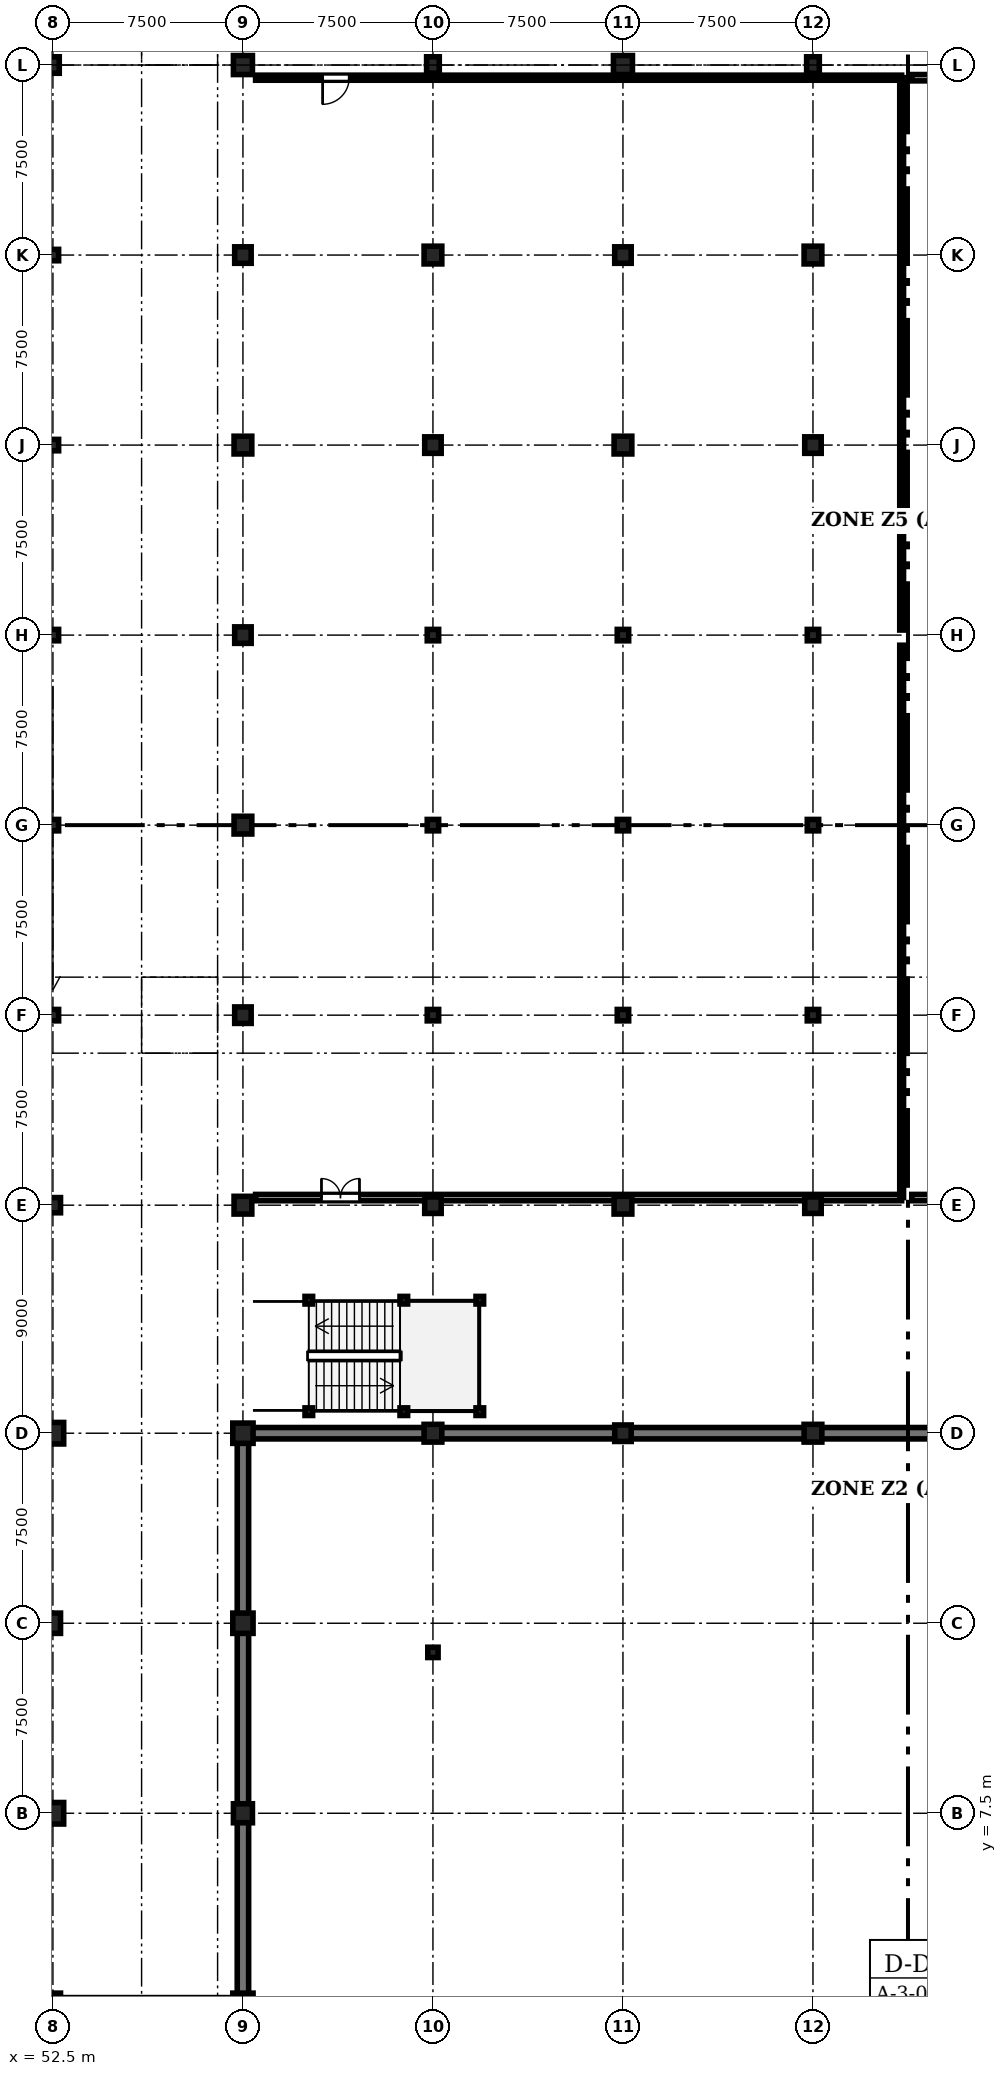
"""IFC4 building model, lengths in metres.
Left out: names, types, materials, properties, quantities, classifications, styles, units other than length and angle.
Written with IfcOpenShell. Run it as: python <this file> out.ifc"""

import sys

from ifc_helpers import new_model, si_unit, direction, frame, frame_2d, origin, origin_2d, place, context, subcontext, project, spatial, rectangle, circle, hollow_circle, i_section, extrude, element, fill, save


model = new_model("IFC4")
c1 = context("Model", 3, precision=1e-05, world=origin(), true_north=direction((0.0, 1.0)))
c2 = subcontext(c1, "Body", "Model", "MODEL_VIEW")
j1 = project(units=[si_unit("LENGTHUNIT", "METRE"), si_unit("PLANEANGLEUNIT", "RADIAN")], contexts=[c1])
p1 = place(None, origin())
s1 = spatial("IfcSite", under=j1, at=p1, CompositionType="ELEMENT")
p2 = place(p1, origin())
s2 = spatial("IfcBuilding", under=s1, at=p2, CompositionType="ELEMENT")
p3 = place(p2, frame((0.0, 0.0, -4.5)))
s3 = spatial("IfcBuildingStorey", under=s2, at=p3, CompositionType="ELEMENT", Elevation=-4.5)
p4 = place(p3, frame((52.5, 0.0, 0.0), z_axis=(0.0, 0.0, 1.0), x_axis=(1.0, 0.0, 0.0)))
e1 = element("IfcColumn", 1, at=p4, inside=s3, PredefinedType="COLUMN", context=c2, shape_type="SweptSolid", body=[
    extrude(rectangle(XDim=0.6, YDim=0.8, at=origin_2d()), origin(), (0.0, 0.0, 1.0), 4.5),
])
p5 = place(p3, frame((52.5, 7.5, 0.0), z_axis=(0.0, 0.0, 1.0), x_axis=(1.0, 0.0, 0.0)))
e2 = element("IfcColumn", 2, at=p5, inside=s3, PredefinedType="COLUMN", context=c2, shape_type="SweptSolid", body=[
    extrude(rectangle(XDim=0.85, YDim=0.85, at=origin_2d()), origin(), (0.0, 0.0, 1.0), 4.5),
])
p6 = place(p3, frame((52.5, 15.0, 0.0), z_axis=(0.0, 0.0, 1.0), x_axis=(1.0, 0.0, 0.0)))
e3 = element("IfcColumn", 3, at=p6, inside=s3, PredefinedType="COLUMN", context=c2, shape_type="SweptSolid", body=[
    extrude(rectangle(XDim=0.6, YDim=0.8, at=origin_2d()), origin(), (0.0, 0.0, 1.0), 4.5),
])
p7 = place(p3, frame((52.5, 22.5, 0.0), z_axis=(0.0, 0.0, 1.0), x_axis=(1.0, 0.0, 0.0)))
e4 = element("IfcColumn", 4, at=p7, inside=s3, PredefinedType="COLUMN", context=c2, shape_type="SweptSolid", body=[
    extrude(rectangle(XDim=0.85, YDim=0.85, at=origin_2d()), origin(), (0.0, 0.0, 1.0), 4.5),
])
p8 = place(p3, frame((52.5, 31.5, 0.0), z_axis=(0.0, 0.0, 1.0), x_axis=(1.0, 0.0, 0.0)))
e5 = element("IfcColumn", 5, at=p8, inside=s3, PredefinedType="COLUMN", context=c2, shape_type="SweptSolid", body=[
    extrude(rectangle(XDim=0.6, YDim=0.6, at=origin_2d()), origin(), (0.0, 0.0, 1.0), 4.5),
])
for number, where, z_axis, x_axis in (
    (6, (52.5, 39.0, 0.0), (0.0, 0.0, 1.0), (1.0, 0.0, 0.0)),
    (7, (52.5, 46.5, 0.0), (0.0, 0.0, 1.0), (1.0, 0.0, 0.0)),
    (8, (52.5, 54.0, 0.0), (0.0, 0.0, 1.0), (1.0, 0.0, 0.0)),
    (9, (52.5, 61.5, 0.0), (0.0, 0.0, 1.0), (1.0, 0.0, 0.0)),
    (10, (52.5, 69.0, 0.0), (0.0, 0.0, 1.0), (1.0, 0.0, 0.0)),
):
    element("IfcColumn", number, at=place(p3, frame(where, z_axis=z_axis, x_axis=x_axis)), inside=s3, PredefinedType="COLUMN", context=c2, shape_type="SweptSolid", body=[
        extrude(rectangle(XDim=0.45, YDim=0.45, at=origin_2d()), origin(), (0.0, 0.0, 1.0), 4.5),
    ])
p9 = place(p3, frame((52.5, 76.5, 0.0), z_axis=(0.0, 0.0, 1.0), x_axis=(1.0, 0.0, 0.0)))
e11 = element("IfcColumn", 11, at=p9, inside=s3, PredefinedType="COLUMN", context=c2, shape_type="SweptSolid", body=[
    extrude(rectangle(XDim=0.5, YDim=0.65, at=origin_2d()), origin(), (0.0, 0.0, 1.0), 4.5),
])
p10 = place(p3, frame((60.0, 0.0, 0.0), z_axis=(0.0, 0.0, 1.0), x_axis=(1.0, 0.0, 0.0)))
e12 = element("IfcColumn", 12, at=p10, inside=s3, PredefinedType="COLUMN", context=c2, shape_type="SweptSolid", body=[
    extrude(rectangle(XDim=0.8, YDim=0.8, at=origin_2d()), origin(), (0.0, 0.0, 1.0), 4.5),
])
p11 = place(p3, frame((60.0, 7.5, 0.0), z_axis=(0.0, 0.0, 1.0), x_axis=(1.0, 0.0, 0.0)))
e13 = element("IfcColumn", 13, at=p11, inside=s3, PredefinedType="COLUMN", context=c2, shape_type="SweptSolid", body=[
    extrude(circle(Radius=0.375, at=origin_2d()), origin(), (0.0, 0.0, 1.0), 4.5),
])
for number, where, z_axis, x_axis in (
    (14, (60.0, 15.0, 0.0), (0.0, 0.0, 1.0), (1.0, 0.0, 0.0)),
    (15, (60.0, 22.5, 0.0), (0.0, 0.0, 1.0), (1.0, 0.0, 0.0)),
):
    element("IfcColumn", number, at=place(p3, frame(where, z_axis=z_axis, x_axis=x_axis)), inside=s3, PredefinedType="COLUMN", context=c2, shape_type="SweptSolid", body=[
        extrude(rectangle(XDim=0.8, YDim=0.8, at=origin_2d()), origin(), (0.0, 0.0, 1.0), 4.5),
    ])
p12 = place(p3, frame((60.0, 31.5, 0.0), z_axis=(0.0, 0.0, 1.0), x_axis=(1.0, 0.0, 0.0)))
e16 = element("IfcColumn", 16, at=p12, inside=s3, PredefinedType="COLUMN", context=c2, shape_type="SweptSolid", body=[
    extrude(rectangle(XDim=0.7, YDim=0.7, at=origin_2d()), origin(), (0.0, 0.0, 1.0), 4.5),
])
p13 = place(p3, frame((60.0, 39.0, 0.0), z_axis=(0.0, 0.0, 1.0), x_axis=(1.0, 0.0, 0.0)))
e17 = element("IfcColumn", 17, at=p13, inside=s3, PredefinedType="COLUMN", context=c2, shape_type="SweptSolid", body=[
    extrude(rectangle(XDim=0.65, YDim=0.65, at=origin_2d()), origin(), (0.0, 0.0, 1.0), 4.5),
])
p14 = place(p3, frame((60.0, 46.5, 0.0), z_axis=(0.0, 0.0, 1.0), x_axis=(1.0, 0.0, 0.0)))
e18 = element("IfcColumn", 18, at=p14, inside=s3, PredefinedType="COLUMN", context=c2, shape_type="SweptSolid", body=[
    extrude(rectangle(XDim=0.7, YDim=0.7, at=origin_2d()), origin(), (0.0, 0.0, 1.0), 4.5),
])
p15 = place(p3, frame((60.0, 54.0, 0.0), z_axis=(0.0, 0.0, 1.0), x_axis=(1.0, 0.0, 0.0)))
e19 = element("IfcColumn", 19, at=p15, inside=s3, PredefinedType="COLUMN", context=c2, shape_type="SweptSolid", body=[
    extrude(rectangle(XDim=0.65, YDim=0.65, at=origin_2d()), origin(), (0.0, 0.0, 1.0), 4.5),
])
p16 = place(p3, frame((60.0, 61.5, 0.0), z_axis=(0.0, 0.0, 1.0), x_axis=(1.0, 0.0, 0.0)))
e20 = element("IfcColumn", 20, at=p16, inside=s3, PredefinedType="COLUMN", context=c2, shape_type="SweptSolid", body=[
    extrude(rectangle(XDim=0.7, YDim=0.7, at=origin_2d()), origin(), (0.0, 0.0, 1.0), 4.5),
])
p17 = place(p3, frame((60.0, 69.0, 0.0), z_axis=(0.0, 0.0, 1.0), x_axis=(1.0, 0.0, 0.0)))
e21 = element("IfcColumn", 21, at=p17, inside=s3, PredefinedType="COLUMN", context=c2, shape_type="SweptSolid", body=[
    extrude(rectangle(XDim=0.65, YDim=0.65, at=origin_2d()), origin(), (0.0, 0.0, 1.0), 4.5),
])
p18 = place(p3, frame((60.0, 76.5, 0.0), z_axis=(0.0, 0.0, 1.0), x_axis=(1.0, 0.0, 0.0)))
e22 = element("IfcColumn", 22, at=p18, inside=s3, PredefinedType="COLUMN", context=c2, shape_type="SweptSolid", body=[
    extrude(rectangle(XDim=0.75, YDim=0.75, at=origin_2d()), origin(), (0.0, 0.0, 1.0), 4.5),
])
p19 = place(p3, frame((67.5, 22.5, 0.0), z_axis=(0.0, 0.0, 1.0), x_axis=(1.0, 0.0, 0.0)))
e23 = element("IfcColumn", 23, at=p19, inside=s3, PredefinedType="COLUMN", context=c2, shape_type="SweptSolid", body=[
    extrude(rectangle(XDim=0.7, YDim=0.7, at=origin_2d()), origin(), (0.0, 0.0, 1.0), 4.5),
])
p20 = place(p3, frame((67.5, 31.5, 0.0), z_axis=(0.0, 0.0, 1.0), x_axis=(1.0, 0.0, 0.0)))
e24 = element("IfcColumn", 24, at=p20, inside=s3, PredefinedType="COLUMN", context=c2, shape_type="SweptSolid", body=[
    extrude(rectangle(XDim=0.65, YDim=0.65, at=origin_2d()), origin(), (0.0, 0.0, 1.0), 4.5),
])
for number, where, z_axis, x_axis in (
    (25, (67.5, 39.0, 0.0), (0.0, 0.0, 1.0), (1.0, 0.0, 0.0)),
    (26, (67.5, 46.5, 0.0), (0.0, 0.0, 1.0), (1.0, 0.0, 0.0)),
    (27, (67.5, 54.0, 0.0), (0.0, 0.0, 1.0), (1.0, 0.0, 0.0)),
):
    element("IfcColumn", number, at=place(p3, frame(where, z_axis=z_axis, x_axis=x_axis)), inside=s3, PredefinedType="COLUMN", context=c2, shape_type="SweptSolid", body=[
        extrude(rectangle(XDim=0.45, YDim=0.45, at=origin_2d()), origin(), (0.0, 0.0, 1.0), 4.5),
    ])
p21 = place(p3, frame((67.5, 61.5, 0.0), z_axis=(0.0, 0.0, 1.0), x_axis=(1.0, 0.0, 0.0)))
e28 = element("IfcColumn", 28, at=p21, inside=s3, PredefinedType="COLUMN", context=c2, shape_type="SweptSolid", body=[
    extrude(rectangle(XDim=0.65, YDim=0.65, at=origin_2d()), origin(), (0.0, 0.0, 1.0), 4.5),
])
p22 = place(p3, frame((67.5, 69.0, 0.0), z_axis=(0.0, 0.0, 1.0), x_axis=(1.0, 0.0, 0.0)))
e29 = element("IfcColumn", 29, at=p22, inside=s3, PredefinedType="COLUMN", context=c2, shape_type="SweptSolid", body=[
    extrude(rectangle(XDim=0.7, YDim=0.7, at=origin_2d()), origin(), (0.0, 0.0, 1.0), 4.5),
])
p23 = place(p3, frame((67.5, 76.5, 0.0), z_axis=(0.0, 0.0, 1.0), x_axis=(1.0, 0.0, 0.0)))
e30 = element("IfcColumn", 30, at=p23, inside=s3, PredefinedType="COLUMN", context=c2, shape_type="SweptSolid", body=[
    extrude(rectangle(XDim=0.5, YDim=0.65, at=origin_2d()), origin(), (0.0, 0.0, 1.0), 4.5),
])
p24 = place(p3, frame((75.0, 22.5, 0.0), z_axis=(0.0, 0.0, 1.0), x_axis=(1.0, 0.0, 0.0)))
e31 = element("IfcColumn", 31, at=p24, inside=s3, PredefinedType="COLUMN", context=c2, shape_type="SweptSolid", body=[
    extrude(rectangle(XDim=0.65, YDim=0.65, at=origin_2d()), origin(), (0.0, 0.0, 1.0), 4.5),
])
p25 = place(p3, frame((75.0, 31.5, 0.0), z_axis=(0.0, 0.0, 1.0), x_axis=(1.0, 0.0, 0.0)))
e32 = element("IfcColumn", 32, at=p25, inside=s3, PredefinedType="COLUMN", context=c2, shape_type="SweptSolid", body=[
    extrude(rectangle(XDim=0.7, YDim=0.7, at=origin_2d()), origin(), (0.0, 0.0, 1.0), 4.5),
])
for number, where, z_axis, x_axis in (
    (33, (75.0, 39.0, 0.0), (0.0, 0.0, 1.0), (1.0, 0.0, 0.0)),
    (34, (75.0, 46.5, 0.0), (0.0, 0.0, 1.0), (1.0, 0.0, 0.0)),
    (35, (75.0, 54.0, 0.0), (0.0, 0.0, 1.0), (1.0, 0.0, 0.0)),
):
    element("IfcColumn", number, at=place(p3, frame(where, z_axis=z_axis, x_axis=x_axis)), inside=s3, PredefinedType="COLUMN", context=c2, shape_type="SweptSolid", body=[
        extrude(rectangle(XDim=0.45, YDim=0.45, at=origin_2d()), origin(), (0.0, 0.0, 1.0), 4.5),
    ])
p26 = place(p3, frame((75.0, 61.5, 0.0), z_axis=(0.0, 0.0, 1.0), x_axis=(1.0, 0.0, 0.0)))
e36 = element("IfcColumn", 36, at=p26, inside=s3, PredefinedType="COLUMN", context=c2, shape_type="SweptSolid", body=[
    extrude(rectangle(XDim=0.7, YDim=0.7, at=origin_2d()), origin(), (0.0, 0.0, 1.0), 4.5),
])
p27 = place(p3, frame((75.0, 69.0, 0.0), z_axis=(0.0, 0.0, 1.0), x_axis=(1.0, 0.0, 0.0)))
e37 = element("IfcColumn", 37, at=p27, inside=s3, PredefinedType="COLUMN", context=c2, shape_type="SweptSolid", body=[
    extrude(rectangle(XDim=0.65, YDim=0.65, at=origin_2d()), origin(), (0.0, 0.0, 1.0), 4.5),
])
p28 = place(p3, frame((75.0, 76.5, 0.0), z_axis=(0.0, 0.0, 1.0), x_axis=(1.0, 0.0, 0.0)))
e38 = element("IfcColumn", 38, at=p28, inside=s3, PredefinedType="COLUMN", context=c2, shape_type="SweptSolid", body=[
    extrude(rectangle(XDim=0.75, YDim=0.75, at=origin_2d()), origin(), (0.0, 0.0, 1.0), 4.5),
])
p29 = place(p3, frame((82.5, 22.5, 0.0), z_axis=(0.0, 0.0, 1.0), x_axis=(1.0, 0.0, 0.0)))
e39 = element("IfcColumn", 39, at=p29, inside=s3, PredefinedType="COLUMN", context=c2, shape_type="SweptSolid", body=[
    extrude(rectangle(XDim=0.7, YDim=0.7, at=origin_2d()), origin(), (0.0, 0.0, 1.0), 4.5),
])
p30 = place(p3, frame((82.5, 31.5, 0.0), z_axis=(0.0, 0.0, 1.0), x_axis=(1.0, 0.0, 0.0)))
e40 = element("IfcColumn", 40, at=p30, inside=s3, PredefinedType="COLUMN", context=c2, shape_type="SweptSolid", body=[
    extrude(rectangle(XDim=0.65, YDim=0.65, at=origin_2d()), origin(), (0.0, 0.0, 1.0), 4.5),
])
for number, where, z_axis, x_axis in (
    (41, (82.5, 39.0, 0.0), (0.0, 0.0, 1.0), (1.0, 0.0, 0.0)),
    (42, (82.5, 46.5, 0.0), (0.0, 0.0, 1.0), (1.0, 0.0, 0.0)),
    (43, (82.5, 54.0, 0.0), (0.0, 0.0, 1.0), (1.0, 0.0, 0.0)),
):
    element("IfcColumn", number, at=place(p3, frame(where, z_axis=z_axis, x_axis=x_axis)), inside=s3, PredefinedType="COLUMN", context=c2, shape_type="SweptSolid", body=[
        extrude(rectangle(XDim=0.45, YDim=0.45, at=origin_2d()), origin(), (0.0, 0.0, 1.0), 4.5),
    ])
p31 = place(p3, frame((82.5, 61.5, 0.0), z_axis=(0.0, 0.0, 1.0), x_axis=(1.0, 0.0, 0.0)))
e44 = element("IfcColumn", 44, at=p31, inside=s3, PredefinedType="COLUMN", context=c2, shape_type="SweptSolid", body=[
    extrude(rectangle(XDim=0.65, YDim=0.65, at=origin_2d()), origin(), (0.0, 0.0, 1.0), 4.5),
])
p32 = place(p3, frame((82.5, 69.0, 0.0), z_axis=(0.0, 0.0, 1.0), x_axis=(1.0, 0.0, 0.0)))
e45 = element("IfcColumn", 45, at=p32, inside=s3, PredefinedType="COLUMN", context=c2, shape_type="SweptSolid", body=[
    extrude(rectangle(XDim=0.7, YDim=0.7, at=origin_2d()), origin(), (0.0, 0.0, 1.0), 4.5),
])
p33 = place(p3, frame((82.5, 76.5, 0.0), z_axis=(0.0, 0.0, 1.0), x_axis=(1.0, 0.0, 0.0)))
e46 = element("IfcColumn", 46, at=p33, inside=s3, PredefinedType="COLUMN", context=c2, shape_type="SweptSolid", body=[
    extrude(rectangle(XDim=0.5, YDim=0.65, at=origin_2d()), origin(), (0.0, 0.0, 1.0), 4.5),
])
for number, where, z_axis, x_axis in (
    (47, (90.0, 22.5, 0.0), (0.0, 0.0, 1.0), (-1.0, 0.0, 0.0)),
    (48, (82.5, 22.5, 0.0), (0.0, 0.0, 1.0), (-1.0, 0.0, 0.0)),
    (49, (75.0, 22.5, 0.0), (0.0, 0.0, 1.0), (-1.0, 0.0, 0.0)),
    (50, (67.5, 22.5, 0.0), (0.0, 0.0, 1.0), (-1.0, 0.0, 0.0)),
    (51, (60.0, 22.5, 0.0), (0.0, 0.0, 1.0), (0.0, -1.0, 0.0)),
    (52, (60.0, 15.0, 0.0), (0.0, 0.0, 1.0), (0.0, -1.0, 0.0)),
    (53, (60.0, 7.5, 0.0), (0.0, 0.0, 1.0), (0.0, -1.0, 0.0)),
):
    element("IfcWall", number, at=place(p3, frame(where, z_axis=z_axis, x_axis=x_axis)), inside=s3, PredefinedType="SOLIDWALL", context=c2, shape_type="SweptSolid", body=[
        extrude(rectangle(XDim=7.5, YDim=0.45, at=frame_2d((3.75, 0.0))), origin(), (0.0, 0.0, 1.0), 4.14),
    ])
for number, where, z_axis, x_axis in (
    (54, (62.6, 23.35, 0.0), (0.0, 0.0, 1.0), (1.0, 0.0, 0.0)),
    (55, (66.35, 23.35, 0.0), (0.0, 0.0, 1.0), (1.0, 0.0, 0.0)),
    (56, (69.35, 23.35, 0.0), (0.0, 0.0, 1.0), (1.0, 0.0, 0.0)),
    (57, (62.6, 27.75, 0.0), (0.0, 0.0, 1.0), (1.0, 0.0, 0.0)),
    (58, (66.35, 27.75, 0.0), (0.0, 0.0, 1.0), (1.0, 0.0, 0.0)),
    (59, (69.35, 27.75, 0.0), (0.0, 0.0, 1.0), (1.0, 0.0, 0.0)),
):
    element("IfcColumn", number, at=place(p3, frame(where, z_axis=z_axis, x_axis=x_axis)), inside=s3, PredefinedType="COLUMN", context=c2, shape_type="SweptSolid", body=[
        extrude(i_section(OverallWidth=0.3, OverallDepth=0.3, WebThickness=0.011, FlangeThickness=0.019, FilletRadius=0.027, at=origin_2d()), origin(), (0.0, 0.0, 1.0), 4.5),
    ])
p34 = place(p3, frame((67.5, 13.85, 0.0), z_axis=(0.0, 0.0, 1.0), x_axis=(1.0, 0.0, 0.0)))
e60 = element("IfcColumn", 60, at=p34, inside=s3, PredefinedType="COLUMN", context=c2, shape_type="SweptSolid", body=[
    extrude(hollow_circle(Radius=0.203, WallThickness=0.016, at=origin_2d()), origin(), (0.0, 0.0, 1.0), 4.5),
])
p35 = place(p3, frame((60.5, 31.8, 0.0), z_axis=(0.0, 0.0, 1.0), x_axis=(1.0, 0.0, 0.0)))
e61 = element("IfcWall", 61, at=p35, inside=s3, PredefinedType="STANDARD", context=c2, shape_type="SweptSolid", body=[
    extrude(rectangle(XDim=25.5, YDim=0.25, at=frame_2d((12.75, 0.0))), origin(), (0.0, 0.0, 1.0), 3.475),
])
p36 = place(p35, frame((2.6, 0.0, 0.0)))
e62 = element("IfcOpeningElement", 62, at=p36, cuts=e61, PredefinedType="OPENING", context=c2, shape_type="SweptSolid", body=[
    extrude(rectangle(XDim=1.5, YDim=2.3, at=frame_2d((0.75, 1.15))), frame((0.0, 0.135, 0.0), z_axis=(0.0, -1.0, 0.0), x_axis=(1.0, 0.0, 0.0)), (0.0, 0.0, 1.0), 0.27),
])
p37 = place(p3, frame((86.4, 31.8, 0.0), z_axis=(0.0, 0.0, 1.0), x_axis=(1.0, 0.0, 0.0)))
e63 = element("IfcWall", 63, at=p37, inside=s3, PredefinedType="STANDARD", context=c2, shape_type="SweptSolid", body=[
    extrude(rectangle(XDim=25.6, YDim=0.25, at=frame_2d((12.8, 0.0))), origin(), (0.0, 0.0, 1.0), 3.475),
])
p38 = place(p37, frame((21.49, 0.0, 0.0)))
e64 = element("IfcOpeningElement", 64, at=p38, cuts=e63, PredefinedType="OPENING", context=c2, shape_type="SweptSolid", body=[
    extrude(rectangle(XDim=1.5, YDim=2.3, at=frame_2d((0.75, 1.15))), frame((0.0, 0.135, 0.0), z_axis=(0.0, -1.0, 0.0), x_axis=(1.0, 0.0, 0.0)), (0.0, 0.0, 1.0), 0.27),
])
p39 = place(p3, frame((86.0, 76.0, 0.0), z_axis=(0.0, 0.0, 1.0), x_axis=(-1.0, 0.0, 0.0)))
e65 = element("IfcWall", 65, at=p39, inside=s3, PredefinedType="STANDARD", context=c2, shape_type="SweptSolid", body=[
    extrude(rectangle(XDim=25.5, YDim=0.2, at=frame_2d((12.75, 0.0))), origin(), (0.0, 0.0, 1.0), 4.125),
])
p40 = place(p39, frame((21.805, 0.0, 0.0)))
e66 = element("IfcOpeningElement", 66, at=p40, cuts=e65, PredefinedType="OPENING", context=c2, shape_type="SweptSolid", body=[
    extrude(rectangle(XDim=1.05, YDim=2.2, at=frame_2d((0.525, 1.1))), frame((0.0, 0.11, 0.0), z_axis=(0.0, -1.0, 0.0), x_axis=(1.0, 0.0, 0.0)), (0.0, 0.0, 1.0), 0.22),
])
p41 = place(p3, frame((112.0, 76.0, 0.0), z_axis=(0.0, 0.0, 1.0), x_axis=(-1.0, 0.0, 0.0)))
e67 = element("IfcWall", 67, at=p41, inside=s3, PredefinedType="STANDARD", context=c2, shape_type="SweptSolid", body=[
    extrude(rectangle(XDim=25.6, YDim=0.25, at=frame_2d((12.8, 0.0))), origin(), (0.0, 0.0, 1.0), 4.125),
])
p42 = place(p41, frame((2.61, 0.0, 0.0)))
e68 = element("IfcOpeningElement", 68, at=p42, cuts=e67, PredefinedType="OPENING", context=c2, shape_type="SweptSolid", body=[
    extrude(rectangle(XDim=1.5, YDim=2.3, at=frame_2d((0.75, 1.15))), frame((0.0, 0.135, 0.0), z_axis=(0.0, -1.0, 0.0), x_axis=(1.0, 0.0, 0.0)), (0.0, 0.0, 1.0), 0.27),
])
for number, where, z_axis, x_axis in (
    (69, (86.0, 31.8, 0.0), (0.0, 0.0, 1.0), (0.0, 1.0, 0.0)),
    (70, (86.0, 54.2, 0.0), (0.0, 0.0, 1.0), (0.0, 1.0, 0.0)),
):
    element("IfcWall", number, at=place(p3, frame(where, z_axis=z_axis, x_axis=x_axis)), inside=s3, PredefinedType="PARTITIONING", context=c2, shape_type="SweptSolid", body=[
        extrude(rectangle(XDim=21.8, YDim=0.15, at=frame_2d((10.9, 0.0))), origin(), (0.0, 0.0, 1.0), 3.725),
    ])
p43 = place(p36, origin())
e71 = element("IfcDoor", 71, at=p43, inside=s3, OperationType="DOUBLE_DOOR_SINGLE_SWING", PredefinedType="DOOR", context=c2, shape_type="SweptSolid", body=[
    extrude(rectangle(XDim=1.5, YDim=2.3, at=frame_2d((0.75, 1.15))), frame((0.0, 0.025, 0.0), z_axis=(0.0, -1.0, 0.0), x_axis=(1.0, 0.0, 0.0)), (0.0, 0.0, 1.0), 0.05),
])
fill(e62, e71)
p44 = place(p40, origin())
e72 = element("IfcDoor", 72, at=p44, inside=s3, OperationType="SINGLE_SWING_RIGHT", PredefinedType="DOOR", context=c2, shape_type="SweptSolid", body=[
    extrude(rectangle(XDim=1.05, YDim=2.2, at=frame_2d((0.525, 1.1))), frame((0.0, 0.025, 0.0), z_axis=(0.0, -1.0, 0.0), x_axis=(1.0, 0.0, 0.0)), (0.0, 0.0, 1.0), 0.05),
])
fill(e66, e72)
save(model, sys.argv[1])
